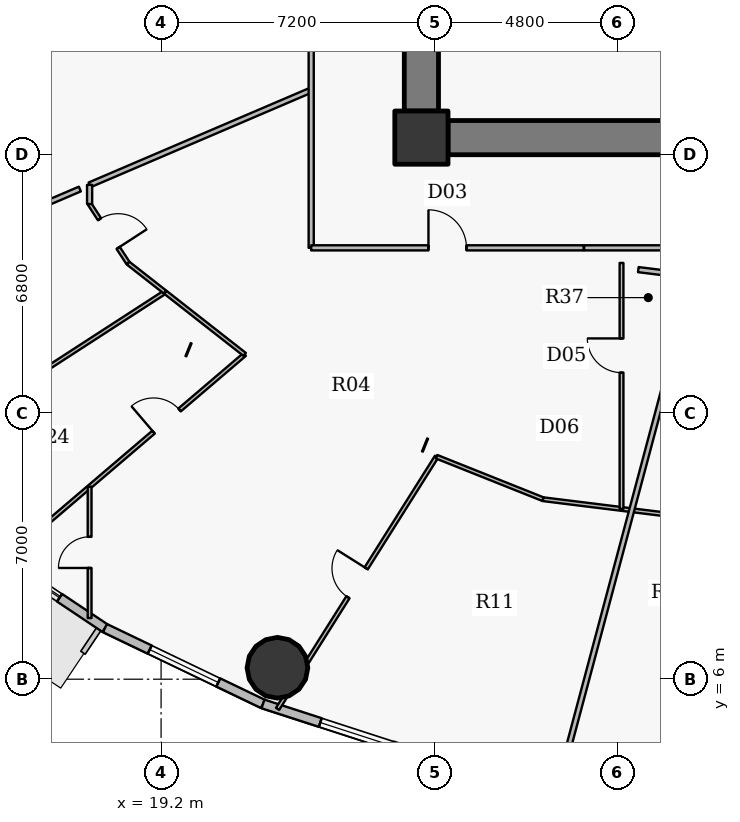
"""IFC4 building model, lengths in metres.
Left out: names, types, materials, properties, quantities, classifications, styles, units other than length and angle.
Written with IfcOpenShell. Run it as: python <this file> out.ifc"""

import sys

from ifc_helpers import new_model, si_unit, direction, frame, frame_2d, origin, origin_2d, place, context, subcontext, project, spatial, rectangle, hollow_circle, extrude, source, transform, mapped, element, fill, save


model = new_model("IFC4")
c1 = context("Model", 3, precision=1e-05, world=origin(), true_north=direction((0.0, 1.0)))
c2 = subcontext(c1, "Body", "Model", "MODEL_VIEW")
j1 = project(units=[si_unit("LENGTHUNIT", "METRE"), si_unit("PLANEANGLEUNIT", "RADIAN")], contexts=[c1])
p1 = place(None, origin())
s1 = spatial("IfcSite", under=j1, at=p1, CompositionType="ELEMENT")
p2 = place(p1, origin())
s2 = spatial("IfcBuilding", under=s1, at=p2, CompositionType="ELEMENT")
p3 = place(p2, frame((0.0, 0.0, 70.2)))
s3 = spatial("IfcBuildingStorey", under=s2, at=p3, CompositionType="ELEMENT", Elevation=70.2)
p4 = place(p3, frame((26.05, 20.25, 0.0), z_axis=(0.0, 0.0, 1.0), x_axis=(1.0, 0.0, 0.0)))
e1 = element("IfcColumn", 1, at=p4, inside=s3, PredefinedType="COLUMN", context=c2, shape_type="SweptSolid", body=[
    extrude(rectangle(XDim=1.4, YDim=1.4, at=origin_2d()), origin(), (0.0, 0.0, 1.0), 4.2),
])
p5 = place(p3, frame((45.25, 20.25, 0.0), z_axis=(0.0, 0.0, 1.0), x_axis=(-1.0, 0.0, 0.0)))
e2 = element("IfcWall", 2, at=p5, inside=s3, PredefinedType="SHEAR", context=c2, shape_type="SweptSolid", body=[
    extrude(rectangle(XDim=18.5, YDim=0.9, at=frame_2d((9.25, 0.0))), origin(), (0.0, 0.0, 1.0), 3.4),
])
p6 = place(p5, frame((10.0, 0.0, 0.0)))
e3 = element("IfcOpeningElement", 3, at=p6, cuts=e2, PredefinedType="OPENING", context=c2, shape_type="SweptSolid", body=[
    extrude(rectangle(XDim=1.15, YDim=2.15, at=origin_2d()), frame((0.575, 0.46, 1.075), z_axis=(0.0, -1.0, 0.0), x_axis=(1.0, 0.0, 0.0)), (0.0, 0.0, 1.0), 0.92),
])
p7 = place(p3, frame((26.05, 20.95, 0.0), z_axis=(0.0, 0.0, 1.0), x_axis=(0.0, 1.0, 0.0)))
e4 = element("IfcWall", 4, at=p7, inside=s3, PredefinedType="SHEAR", context=c2, shape_type="SweptSolid", body=[
    extrude(rectangle(XDim=12.1, YDim=0.9, at=frame_2d((6.05, 0.0))), origin(), (0.0, 0.0, 1.0), 3.4),
])
p8 = place(p7, frame((5.64, 0.0, 0.0)))
e5 = element("IfcOpeningElement", 5, at=p8, cuts=e4, PredefinedType="OPENING", context=c2, shape_type="SweptSolid", body=[
    extrude(rectangle(XDim=0.82, YDim=2.1, at=origin_2d()), frame((0.41, 0.46, 1.05), z_axis=(0.0, -1.0, 0.0), x_axis=(1.0, 0.0, 0.0)), (0.0, 0.0, 1.0), 0.92),
])
p9 = place(p3, frame((22.262, 6.301, 0.0), z_axis=(0.0, 0.0, 1.0), x_axis=(1.0, 0.0, 0.0)))
e6 = element("IfcColumn", 6, at=p9, inside=s3, PredefinedType="COLUMN", context=c2, shape_type="SweptSolid", body=[
    extrude(hollow_circle(Radius=0.8, WallThickness=0.045, at=origin_2d()), origin(), (0.0, 0.0, 1.0), 4.2),
])
p10 = place(p3, frame((17.723, 7.344, 0.0), z_axis=(0.0, 0.0, 1.0), x_axis=(-0.831240982525, 0.555912249343, 0.0)))
e7 = element("IfcWall", 7, at=p10, inside=s3, PredefinedType="SOLIDWALL", context=c2, shape_type="SweptSolid", body=[
    extrude(rectangle(XDim=4.46, YDim=0.24, at=frame_2d((2.23, 0.0))), origin(), (0.0, 0.0, 1.0), 3.95),
])
p11 = place(p10, frame((1.439, 0.0, 0.9)))
e8 = element("IfcOpeningElement", 8, at=p11, cuts=e7, PredefinedType="OPENING", context=c2, shape_type="SweptSolid", body=[
    extrude(rectangle(XDim=1.25, YDim=1.65, at=origin_2d()), frame((0.625, 0.13, 0.825), z_axis=(0.0, -1.0, 0.0), x_axis=(1.0, 0.0, 0.0)), (0.0, 0.0, 1.0), 0.26),
])
p12 = place(p3, frame((21.882, 5.349, 0.0), z_axis=(0.0, 0.0, 1.0), x_axis=(-0.901601503137, 0.432567601123, 0.0)))
e9 = element("IfcWall", 9, at=p12, inside=s3, PredefinedType="SOLIDWALL", context=c2, shape_type="SweptSolid", body=[
    extrude(rectangle(XDim=4.613, YDim=0.24, at=frame_2d((2.306, 0.0))), origin(), (0.0, 0.0, 1.0), 3.95),
])
p13 = place(p12, frame((1.306, 0.0, 0.9)))
e10 = element("IfcOpeningElement", 10, at=p13, cuts=e9, PredefinedType="OPENING", context=c2, shape_type="SweptSolid", body=[
    extrude(rectangle(XDim=2.0, YDim=1.75, at=origin_2d()), frame((1.0, 0.13, 0.875), z_axis=(0.0, -1.0, 0.0), x_axis=(1.0, 0.0, 0.0)), (0.0, 0.0, 1.0), 0.26),
])
p14 = place(p3, frame((26.389, 3.887, 0.0), z_axis=(0.0, 0.0, 1.0), x_axis=(-0.951207699013, 0.308551313946, 0.0)))
e11 = element("IfcWall", 11, at=p14, inside=s3, PredefinedType="SOLIDWALL", context=c2, shape_type="SweptSolid", body=[
    extrude(rectangle(XDim=4.739, YDim=0.24, at=frame_2d((2.369, 0.0))), origin(), (0.0, 0.0, 1.0), 3.95),
])
p15 = place(p14, frame((1.155, 0.0, 0.9)))
e12 = element("IfcOpeningElement", 12, at=p15, cuts=e11, PredefinedType="OPENING", context=c2, shape_type="SweptSolid", body=[
    extrude(rectangle(XDim=2.0, YDim=1.75, at=origin_2d()), frame((1.0, 0.13, 0.875), z_axis=(0.0, -1.0, 0.0), x_axis=(1.0, 0.0, 0.0)), (0.0, 0.0, 1.0), 0.26),
])
p16 = place(p3, frame((8.785, 15.356, 0.0), z_axis=(0.0, 0.0, 1.0), x_axis=(0.919377695517, 0.393375968998, 0.0)))
e13 = element("IfcWall", 13, at=p16, inside=s3, PredefinedType="PARTITIONING", context=c2, shape_type="SweptSolid", body=[
    extrude(rectangle(XDim=9.003, YDim=0.135, at=frame_2d((4.502, 0.0))), origin(), (0.0, 0.0, 1.0), 3.335),
])
p17 = place(p3, frame((12.133, 11.542, 0.0), z_axis=(0.0, 0.0, 1.0), x_axis=(0.839345439493, 0.5435984117, 0.0)))
e14 = element("IfcWall", 14, at=p17, inside=s3, PredefinedType="PARTITIONING", context=c2, shape_type="SweptSolid", body=[
    extrude(rectangle(XDim=8.543, YDim=0.1, at=frame_2d((4.271, 0.0))), origin(), (0.0, 0.0, 1.0), 3.335),
])
p18 = place(p3, frame((15.048, 9.127, 0.0), z_axis=(0.0, 0.0, 1.0), x_axis=(0.760804650013, 0.648980958517, 0.0)))
e15 = element("IfcWall", 15, at=p18, inside=s3, PredefinedType="PARTITIONING", context=c2, shape_type="SweptSolid", body=[
    extrude(rectangle(XDim=8.349, YDim=0.1, at=frame_2d((4.174, 0.0))), origin(), (0.0, 0.0, 1.0), 3.335),
])
p19 = place(p18, frame((5.197, 0.0, 0.0)))
e16 = element("IfcOpeningElement", 16, at=p19, cuts=e15, PredefinedType="OPENING", context=c2, shape_type="SweptSolid", body=[
    extrude(rectangle(XDim=0.9, YDim=2.1, at=origin_2d()), frame((0.45, 0.06, 1.05), z_axis=(0.0, -1.0, 0.0), x_axis=(1.0, 0.0, 0.0)), (0.0, 0.0, 1.0), 0.12),
])
p20 = place(p3, frame((17.319, 7.608, 0.0), z_axis=(0.0, 0.0, 1.0), x_axis=(0.0, 1.0, 0.0)))
e17 = element("IfcWall", 17, at=p20, inside=s3, PredefinedType="PARTITIONING", context=c2, shape_type="SweptSolid", body=[
    extrude(rectangle(XDim=3.457, YDim=0.1, at=frame_2d((1.728, 0.0))), origin(), (0.0, 0.0, 1.0), 3.335),
])
p21 = place(p20, frame((1.318, 0.0, 0.0)))
e18 = element("IfcOpeningElement", 18, at=p21, cuts=e17, PredefinedType="OPENING", context=c2, shape_type="SweptSolid", body=[
    extrude(rectangle(XDim=0.82, YDim=2.1, at=origin_2d()), frame((0.41, 0.06, 1.05), z_axis=(0.0, -1.0, 0.0), x_axis=(1.0, 0.0, 0.0)), (0.0, 0.0, 1.0), 0.12),
])
p22 = place(p3, frame((17.319, 18.503, 0.0), z_axis=(0.0, 0.0, 1.0), x_axis=(0.54537223853, -0.838193964092, 0.0)))
e19 = element("IfcWall", 19, at=p22, inside=s3, PredefinedType="PARTITIONING", context=c2, shape_type="SweptSolid", body=[
    extrude(rectangle(XDim=1.855, YDim=0.1, at=frame_2d((0.927, 0.0))), origin(), (0.0, 0.0, 1.0), 3.95),
])
p23 = place(p22, frame((0.478, 0.0, 0.0)))
e20 = element("IfcOpeningElement", 20, at=p23, cuts=e19, PredefinedType="OPENING", context=c2, shape_type="SweptSolid", body=[
    extrude(rectangle(XDim=0.9, YDim=2.1, at=origin_2d()), frame((0.45, 0.06, 1.05), z_axis=(0.0, -1.0, 0.0), x_axis=(1.0, 0.0, 0.0)), (0.0, 0.0, 1.0), 0.12),
])
p24 = place(p3, frame((17.319, 19.007, 0.0), z_axis=(0.0, 0.0, 1.0), x_axis=(0.919369884618, 0.393394223721, 0.0)))
e21 = element("IfcWall", 21, at=p24, inside=s3, PredefinedType="PARTITIONING", context=c2, shape_type="SweptSolid", body=[
    extrude(rectangle(XDim=6.342, YDim=0.135, at=frame_2d((3.171, 0.0))), origin(), (0.0, 0.0, 1.0), 3.95),
])
p25 = place(p3, frame((18.331, 16.948, 0.0), z_axis=(0.0, 0.0, 1.0), x_axis=(0.787379901086, -0.61646807814, 0.0)))
e22 = element("IfcWall", 22, at=p25, inside=s3, PredefinedType="PARTITIONING", context=c2, shape_type="SweptSolid", body=[
    extrude(rectangle(XDim=1.236, YDim=0.1, at=frame_2d((0.618, 0.0))), origin(), (0.0, 0.0, 1.0), 3.95),
])
p26 = place(p3, frame((19.312, 16.18, 0.0), z_axis=(0.0, 0.0, 1.0), x_axis=(0.787365097885, -0.616486984967, 0.0)))
e23 = element("IfcWall", 23, at=p26, inside=s3, PredefinedType="PARTITIONING", context=c2, shape_type="SweptSolid", body=[
    extrude(rectangle(XDim=2.652, YDim=0.1, at=frame_2d((1.326, 0.0))), origin(), (0.0, 0.0, 1.0), 3.285),
])
p27 = place(p3, frame((22.265, 5.219, 0.0), z_axis=(0.0, 0.0, 1.0), x_axis=(0.53341083449, 0.845856300827, 0.0)))
e24 = element("IfcWall", 24, at=p27, inside=s3, PredefinedType="PARTITIONING", context=c2, shape_type="SweptSolid", body=[
    extrude(rectangle(XDim=7.844, YDim=0.1, at=frame_2d((3.922, 0.0))), origin(), (0.0, 0.0, 1.0), 3.335),
])
p28 = place(p27, frame((3.472, 0.0, 0.0)))
e25 = element("IfcOpeningElement", 25, at=p28, cuts=e24, PredefinedType="OPENING", context=c2, shape_type="SweptSolid", body=[
    extrude(rectangle(XDim=0.9, YDim=2.1, at=origin_2d()), frame((0.45, 0.06, 1.05), z_axis=(0.0, -1.0, 0.0), x_axis=(1.0, 0.0, 0.0)), (0.0, 0.0, 1.0), 0.12),
])
p29 = place(p3, frame((23.15, 17.35, 0.0), z_axis=(0.0, 0.0, 1.0), x_axis=(0.0, 1.0, 0.0)))
e26 = element("IfcWall", 26, at=p29, inside=s3, PredefinedType="PARTITIONING", context=c2, shape_type="SweptSolid", body=[
    extrude(rectangle(XDim=8.729, YDim=0.135, at=frame_2d((4.365, 0.0))), origin(), (0.0, 0.0, 1.0), 3.285),
])
p30 = place(p29, frame((5.921, 0.0, 0.0)))
e27 = element("IfcOpeningElement", 27, at=p30, cuts=e26, PredefinedType="OPENING", context=c2, shape_type="SweptSolid", body=[
    extrude(rectangle(XDim=1.0, YDim=2.15, at=origin_2d()), frame((0.5, 0.078, 1.075), z_axis=(0.0, -1.0, 0.0), x_axis=(1.0, 0.0, 0.0)), (0.0, 0.0, 1.0), 0.155),
])
p31 = place(p3, frame((23.15, 17.35, 0.0), z_axis=(0.0, 0.0, 1.0), x_axis=(1.0, 0.0, 0.0)))
e28 = element("IfcWall", 28, at=p31, inside=s3, PredefinedType="PARTITIONING", context=c2, shape_type="SweptSolid", body=[
    extrude(rectangle(XDim=7.171, YDim=0.135, at=frame_2d((3.586, 0.0))), origin(), (0.0, 0.0, 1.0), 3.285),
])
p32 = place(p31, frame((3.086, 0.0, 0.0)))
e29 = element("IfcOpeningElement", 29, at=p32, cuts=e28, PredefinedType="OPENING", context=c2, shape_type="SweptSolid", body=[
    extrude(rectangle(XDim=1.0, YDim=2.15, at=origin_2d()), frame((0.5, 0.078, 1.075), z_axis=(0.0, -1.0, 0.0), x_axis=(1.0, 0.0, 0.0)), (0.0, 0.0, 1.0), 0.155),
])
p33 = place(p3, frame((26.449, 11.854, 0.0), z_axis=(0.0, 0.0, 1.0), x_axis=(0.928822359266, -0.370525336417, 0.0)))
e30 = element("IfcWall", 30, at=p33, inside=s3, PredefinedType="PARTITIONING", context=c2, shape_type="SweptSolid", body=[
    extrude(rectangle(XDim=3.016, YDim=0.1, at=frame_2d((1.508, 0.0))), origin(), (0.0, 0.0, 1.0), 3.95),
])
p34 = place(p3, frame((29.251, 10.736, 0.0), z_axis=(0.0, 0.0, 1.0), x_axis=(0.992394520877, -0.123097989151, 0.0)))
e31 = element("IfcWall", 31, at=p34, inside=s3, PredefinedType="PARTITIONING", context=c2, shape_type="SweptSolid", body=[
    extrude(rectangle(XDim=6.801, YDim=0.1, at=frame_2d((3.4, 0.0))), origin(), (0.0, 0.0, 1.0), 3.285),
])
p35 = place(p3, frame((29.669, 3.265, 0.0), z_axis=(0.0, 0.0, 1.0), x_axis=(0.257716621334, 0.96622054578, 0.0)))
e32 = element("IfcWall", 32, at=p35, inside=s3, PredefinedType="PARTITIONING", context=c2, shape_type="SweptSolid", body=[
    extrude(rectangle(XDim=13.796, YDim=0.135, at=frame_2d((6.898, 0.0))), origin(), (0.0, 0.0, 1.0), 3.335),
])
p36 = place(p3, frame((31.316, 10.48, 0.0), z_axis=(0.0, 0.0, 1.0), x_axis=(0.0, 1.0, 0.0)))
e33 = element("IfcWall", 33, at=p36, inside=s3, PredefinedType="PARTITIONING", context=c2, shape_type="SweptSolid", body=[
    extrude(rectangle(XDim=6.473, YDim=0.1, at=frame_2d((3.237, 0.0))), origin(), (0.0, 0.0, 1.0), 3.95),
])
p37 = place(p36, frame((3.587, 0.0, 0.0)))
e34 = element("IfcOpeningElement", 34, at=p37, cuts=e33, PredefinedType="OPENING", context=c2, shape_type="SweptSolid", body=[
    extrude(rectangle(XDim=0.9, YDim=2.1, at=origin_2d()), frame((0.45, 0.06, 1.05), z_axis=(0.0, -1.0, 0.0), x_axis=(1.0, 0.0, 0.0)), (0.0, 0.0, 1.0), 0.12),
])
p38 = place(p3, frame((36.389, 17.35, 0.0), z_axis=(0.0, 0.0, 1.0), x_axis=(-1.0, 0.0, 0.0)))
e35 = element("IfcWall", 35, at=p38, inside=s3, PredefinedType="PARTITIONING", context=c2, shape_type="SweptSolid", body=[
    extrude(rectangle(XDim=6.057, YDim=0.135, at=frame_2d((3.029, 0.0))), origin(), (0.0, 0.0, 1.0), 3.285),
])
p39 = place(p3, frame((25.6, 20.94, 0.0), z_axis=(0.0, 0.0, 1.0), x_axis=(0.0, -1.0, 0.0)))
e36 = element("IfcWall", 36, at=p39, inside=s3, PredefinedType="PARTITIONING", context=c2, shape_type="SweptSolid", body=[
    extrude(rectangle(XDim=1.14, YDim=0.135, at=frame_2d((0.57, 0.0))), origin(), (0.0, 0.0, 1.0), 3.95),
])
p40 = place(p3, frame((25.907, 19.8, 0.0), z_axis=(0.0, 0.0, 1.0), x_axis=(1.0, 0.0, 0.0)))
e37 = element("IfcWall", 37, at=p40, inside=s3, PredefinedType="PARTITIONING", context=c2, shape_type="SweptSolid", body=[
    extrude(rectangle(XDim=0.833, YDim=0.135, at=frame_2d((0.416, 0.0))), origin(), (0.0, 0.0, 1.0), 3.285),
])
p41 = place(p3, frame((17.319, 18.503, 0.0), z_axis=(0.0, 0.0, 1.0), x_axis=(0.0, 1.0, 0.0)))
e38 = element("IfcWall", 38, at=p41, inside=s3, PredefinedType="PARTITIONING", context=c2, shape_type="SweptSolid", body=[
    extrude(rectangle(XDim=0.504, YDim=0.135, at=frame_2d((0.252, 0.0))), origin(), (0.0, 0.0, 1.0), 3.95),
])
p42 = place(p3, frame((31.758, 16.777, 0.0), z_axis=(0.0, 0.0, 1.0), x_axis=(0.992411483091, -0.122961165536, 0.0)))
e39 = element("IfcWall", 39, at=p42, inside=s3, PredefinedType="PARTITIONING", context=c2, shape_type="SweptSolid", body=[
    extrude(rectangle(XDim=1.148, YDim=0.135, at=frame_2d((0.574, 0.0))), origin(), (0.0, 0.0, 1.0), 3.95),
])
m1 = source(origin(), c2, "Body", "SweptSolid", [
    extrude(rectangle(XDim=1.25, YDim=1.65, at=origin_2d()), frame((0.625, 0.03, 0.825), z_axis=(0.0, -1.0, 0.0), x_axis=(1.0, 0.0, 0.0)), (0.0, 0.0, 1.0), 0.06),
])
p43 = place(p11, origin())
e40 = element("IfcWindow", 40, at=p43, inside=s3, PartitioningType="SINGLE_PANEL", PredefinedType="WINDOW", context=c2, shape_type="MappedRepresentation", body=[
    mapped(m1, transform((0.0, 0.0, 0.0), x_axis=(1.0, 0.0, 0.0), y_axis=(0.0, 1.0, 0.0), z_axis=(0.0, 0.0, 1.0), scale=1.0)),
])
fill(e8, e40)
m2 = source(origin(), c2, "Body", "SweptSolid", [
    extrude(rectangle(XDim=2.0, YDim=1.75, at=origin_2d()), frame((1.0, 0.03, 0.875), z_axis=(0.0, -1.0, 0.0), x_axis=(1.0, 0.0, 0.0)), (0.0, 0.0, 1.0), 0.06),
])
p44 = place(p13, origin())
e41 = element("IfcWindow", 41, at=p44, inside=s3, PartitioningType="DOUBLE_PANEL_VERTICAL", PredefinedType="WINDOW", context=c2, shape_type="MappedRepresentation", body=[
    mapped(m2, transform((0.0, 0.0, 0.0), x_axis=(1.0, 0.0, 0.0), y_axis=(0.0, 1.0, 0.0), z_axis=(0.0, 0.0, 1.0), scale=1.0)),
])
fill(e10, e41)
p45 = place(p15, origin())
e42 = element("IfcWindow", 42, at=p45, inside=s3, PartitioningType="DOUBLE_PANEL_VERTICAL", PredefinedType="WINDOW", context=c2, shape_type="MappedRepresentation", body=[
    mapped(m2, transform((0.0, 0.0, 0.0), x_axis=(1.0, 0.0, 0.0), y_axis=(0.0, 1.0, 0.0), z_axis=(0.0, 0.0, 1.0), scale=1.0)),
])
fill(e12, e42)
m3 = source(origin(), c2, "Body", "SweptSolid", [
    extrude(rectangle(XDim=1.0, YDim=2.15, at=origin_2d()), frame((0.5, 0.025, 1.075), z_axis=(0.0, -1.0, 0.0), x_axis=(1.0, 0.0, 0.0)), (0.0, 0.0, 1.0), 0.05),
])
p46 = place(p32, origin())
e43 = element("IfcDoor", 43, at=p46, inside=s3, OperationType="SINGLE_SWING_LEFT", PredefinedType="DOOR", context=c2, shape_type="MappedRepresentation", body=[
    mapped(m3, transform((0.0, 0.0, 0.0), x_axis=(1.0, 0.0, 0.0), y_axis=(0.0, 1.0, 0.0), z_axis=(0.0, 0.0, 1.0), scale=1.0)),
])
fill(e29, e43)
m4 = source(origin(), c2, "Body", "SweptSolid", [
    extrude(rectangle(XDim=0.9, YDim=2.1, at=origin_2d()), frame((0.45, 0.025, 1.05), z_axis=(0.0, -1.0, 0.0), x_axis=(1.0, 0.0, 0.0)), (0.0, 0.0, 1.0), 0.05),
])
p47 = place(p23, origin())
e44 = element("IfcDoor", 44, at=p47, inside=s3, OperationType="SINGLE_SWING_RIGHT", PredefinedType="DOOR", context=c2, shape_type="MappedRepresentation", body=[
    mapped(m4, transform((0.0, 0.0, 0.0), x_axis=(1.0, 0.0, 0.0), y_axis=(0.0, 1.0, 0.0), z_axis=(0.0, 0.0, 1.0), scale=1.0)),
])
fill(e20, e44)
p48 = place(p19, origin())
e45 = element("IfcDoor", 45, at=p48, inside=s3, OperationType="SINGLE_SWING_LEFT", PredefinedType="DOOR", context=c2, shape_type="MappedRepresentation", body=[
    mapped(m4, transform((0.0, 0.0, 0.0), x_axis=(1.0, 0.0, 0.0), y_axis=(0.0, 1.0, 0.0), z_axis=(0.0, 0.0, 1.0), scale=1.0)),
])
fill(e16, e45)
p49 = place(p28, origin())
e46 = element("IfcDoor", 46, at=p49, inside=s3, OperationType="SINGLE_SWING_RIGHT", PredefinedType="DOOR", context=c2, shape_type="MappedRepresentation", body=[
    mapped(m4, transform((0.0, 0.0, 0.0), x_axis=(1.0, 0.0, 0.0), y_axis=(0.0, 1.0, 0.0), z_axis=(0.0, 0.0, 1.0), scale=1.0)),
])
fill(e25, e46)
m5 = source(origin(), c2, "Body", "SweptSolid", [
    extrude(rectangle(XDim=0.82, YDim=2.1, at=origin_2d()), frame((0.41, 0.025, 1.05), z_axis=(0.0, -1.0, 0.0), x_axis=(1.0, 0.0, 0.0)), (0.0, 0.0, 1.0), 0.05),
])
p50 = place(p21, origin())
e47 = element("IfcDoor", 47, at=p50, inside=s3, OperationType="SINGLE_SWING_LEFT", PredefinedType="DOOR", context=c2, shape_type="MappedRepresentation", body=[
    mapped(m5, transform((0.0, 0.0, 0.0), x_axis=(1.0, 0.0, 0.0), y_axis=(0.0, 1.0, 0.0), z_axis=(0.0, 0.0, 1.0), scale=1.0)),
])
fill(e18, e47)
p51 = place(p37, origin())
e48 = element("IfcDoor", 48, at=p51, inside=s3, OperationType="SINGLE_SWING_RIGHT", PredefinedType="DOOR", context=c2, shape_type="MappedRepresentation", body=[
    mapped(m4, transform((0.0, 0.0, 0.0), x_axis=(1.0, 0.0, 0.0), y_axis=(0.0, 1.0, 0.0), z_axis=(0.0, 0.0, 1.0), scale=1.0)),
])
fill(e34, e48)
save(model, sys.argv[1])
